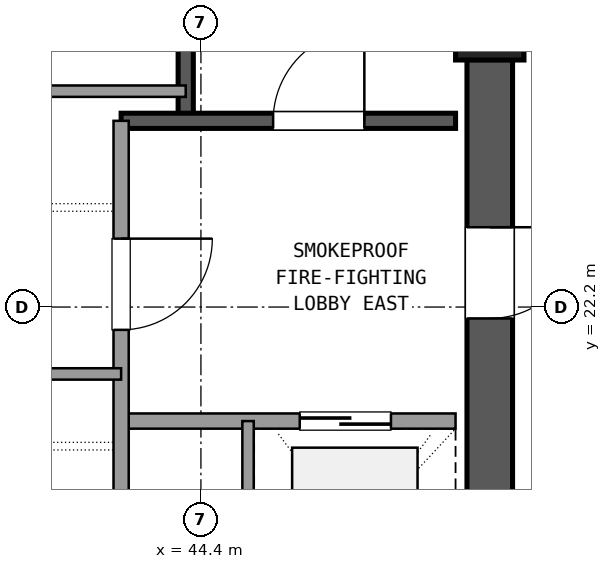
"""IFC4 building model, lengths in metres.
Left out: names, types, materials, properties, quantities, classifications, styles, units other than length and angle.
Written with IfcOpenShell. Run it as: python <this file> out.ifc"""

import sys

from ifc_helpers import new_model, si_unit, direction, frame, frame_2d, origin, origin_2d, place, context, subcontext, project, spatial, rectangle, extrude, element, fill, save


model = new_model("IFC4")
c1 = context("Model", 3, precision=1e-05, world=origin(), true_north=direction((0.0, 1.0)))
c2 = subcontext(c1, "Body", "Model", "MODEL_VIEW")
j1 = project(units=[si_unit("LENGTHUNIT", "METRE"), si_unit("PLANEANGLEUNIT", "RADIAN")], contexts=[c1])
p1 = place(None, origin())
s1 = spatial("IfcSite", under=j1, at=p1, CompositionType="ELEMENT")
p2 = place(p1, origin())
s2 = spatial("IfcBuilding", under=s1, at=p2, CompositionType="ELEMENT")
p3 = place(p2, frame((0.0, 0.0, 207.18)))
s3 = spatial("IfcBuildingStorey", under=s2, at=p3, CompositionType="ELEMENT", Elevation=207.18)
p4 = place(p3, frame((48.2, 25.9, 0.0), z_axis=(0.0, 0.0, 1.0), x_axis=(1.0, 0.0, 0.0)))
e1 = element("IfcColumn", 1, at=p4, inside=s3, PredefinedType="COLUMN", context=c2, shape_type="SweptSolid", body=[
    extrude(rectangle(XDim=0.9, YDim=0.9, at=origin_2d()), origin(), (0.0, 0.0, 1.0), 3.6),
])
p5 = place(p3, frame((48.2, 17.745, 0.0), z_axis=(0.0, 0.0, 1.0), x_axis=(0.0, 1.0, 0.0)))
e2 = element("IfcWall", 2, at=p5, inside=s3, PredefinedType="SHEAR", context=c2, shape_type="SweptSolid", body=[
    extrude(rectangle(XDim=7.71, YDim=0.6, at=frame_2d((3.855, 0.0))), origin(), (0.0, 0.0, 1.0), 3.32),
])
p6 = place(p5, frame((4.305, 0.0, 0.0)))
e3 = element("IfcOpeningElement", 3, at=p6, cuts=e2, PredefinedType="OPENING", context=c2, shape_type="SweptSolid", body=[
    extrude(rectangle(XDim=1.2, YDim=2.15, at=frame_2d((0.6, 1.075))), frame((0.0, 0.31, 0.0), z_axis=(0.0, -1.0, 0.0), x_axis=(1.0, 0.0, 0.0)), (0.0, 0.0, 1.0), 0.62),
])
p7 = place(p3, frame((44.2, 24.65, 0.0), z_axis=(0.0, 0.0, 1.0), x_axis=(0.0, 1.0, 0.0)))
e4 = element("IfcWall", 4, at=p7, inside=s3, PredefinedType="SHEAR", context=c2, shape_type="SweptSolid", body=[
    extrude(rectangle(XDim=9.4, YDim=0.2, at=frame_2d((4.7, 0.0))), origin(), (0.0, 0.0, 1.0), 3.32),
])
p8 = place(p3, frame((43.35, 24.65, 0.0), z_axis=(0.0, 0.0, 1.0), x_axis=(1.0, 0.0, 0.0)))
e5 = element("IfcWall", 5, at=p8, inside=s3, PredefinedType="SHEAR", context=c2, shape_type="SweptSolid", body=[
    extrude(rectangle(XDim=4.4, YDim=0.2, at=frame_2d((2.2, 0.0))), origin(), (0.0, 0.0, 1.0), 3.32),
])
p9 = place(p8, frame((2.0, 0.0, 0.0)))
e6 = element("IfcOpeningElement", 6, at=p9, cuts=e5, PredefinedType="OPENING", context=c2, shape_type="SweptSolid", body=[
    extrude(rectangle(XDim=1.2, YDim=2.15, at=frame_2d((0.6, 1.075))), frame((0.0, 0.11, 0.0), z_axis=(0.0, -1.0, 0.0), x_axis=(1.0, 0.0, 0.0)), (0.0, 0.0, 1.0), 0.22),
])
p10 = place(p3, frame((43.35, 20.7, 0.0), z_axis=(0.0, 0.0, 1.0), x_axis=(1.0, 0.0, 0.0)))
e7 = element("IfcWall", 7, at=p10, inside=s3, PredefinedType="SOLIDWALL", context=c2, shape_type="SweptSolid", body=[
    extrude(rectangle(XDim=4.4, YDim=0.2, at=frame_2d((2.2, 0.0))), origin(), (0.0, 0.0, 1.0), 2.61),
])
p11 = place(p10, frame((2.35, 0.0, 0.0)))
e8 = element("IfcOpeningElement", 8, at=p11, cuts=e7, PredefinedType="OPENING", context=c2, shape_type="SweptSolid", body=[
    extrude(rectangle(XDim=1.2, YDim=2.15, at=frame_2d((0.6, 1.075))), frame((0.0, 0.11, 0.0), z_axis=(0.0, -1.0, 0.0), x_axis=(1.0, 0.0, 0.0)), (0.0, 0.0, 1.0), 0.22),
])
p12 = place(p3, frame((43.35, 17.75, 0.0), z_axis=(0.0, 0.0, 1.0), x_axis=(0.0, 1.0, 0.0)))
e9 = element("IfcWall", 9, at=p12, inside=s3, PredefinedType="SOLIDWALL", context=c2, shape_type="SweptSolid", body=[
    extrude(rectangle(XDim=6.9, YDim=0.2, at=frame_2d((3.45, 0.0))), origin(), (0.0, 0.0, 1.0), 2.61),
])
p13 = place(p12, frame((4.15, 0.0, 0.0)))
e10 = element("IfcOpeningElement", 10, at=p13, cuts=e9, PredefinedType="OPENING", context=c2, shape_type="SweptSolid", body=[
    extrude(rectangle(XDim=1.2, YDim=2.15, at=frame_2d((0.6, 1.075))), frame((0.0, 0.11, 0.0), z_axis=(0.0, -1.0, 0.0), x_axis=(1.0, 0.0, 0.0)), (0.0, 0.0, 1.0), 0.22),
])
p14 = place(p3, frame((45.02, 17.75, 0.0), z_axis=(0.0, 0.0, 1.0), x_axis=(0.0, 1.0, 0.0)))
e11 = element("IfcWall", 11, at=p14, inside=s3, PredefinedType="PARTITIONING", context=c2, shape_type="SweptSolid", body=[
    extrude(rectangle(XDim=2.95, YDim=0.15, at=frame_2d((1.475, 0.0))), origin(), (0.0, 0.0, 1.0), 2.61),
])
p15 = place(p3, frame((37.25, 21.32, 0.0), z_axis=(0.0, 0.0, 1.0), x_axis=(1.0, 0.0, 0.0)))
e12 = element("IfcWall", 12, at=p15, inside=s3, PredefinedType="PARTITIONING", context=c2, shape_type="SweptSolid", body=[
    extrude(rectangle(XDim=6.1, YDim=0.15, at=frame_2d((3.05, 0.0))), origin(), (0.0, 0.0, 1.0), 2.61),
])
p16 = place(p15, frame((0.55, 0.0, 0.0)))
e13 = element("IfcOpeningElement", 13, at=p16, cuts=e12, PredefinedType="OPENING", context=c2, shape_type="SweptSolid", body=[
    extrude(rectangle(XDim=1.0, YDim=2.15, at=frame_2d((0.5, 1.075))), frame((0.0, 0.085, 0.0), z_axis=(0.0, -1.0, 0.0), x_axis=(1.0, 0.0, 0.0)), (0.0, 0.0, 1.0), 0.17),
])
p17 = place(p15, frame((2.5, 0.0, 0.0)))
e14 = element("IfcOpeningElement", 14, at=p17, cuts=e12, PredefinedType="OPENING", context=c2, shape_type="SweptSolid", body=[
    extrude(rectangle(XDim=1.0, YDim=2.15, at=frame_2d((0.5, 1.075))), frame((0.0, 0.085, 0.0), z_axis=(0.0, -1.0, 0.0), x_axis=(1.0, 0.0, 0.0)), (0.0, 0.0, 1.0), 0.17),
])
p18 = place(p3, frame((42.27, 25.04, 0.0), z_axis=(0.0, 0.0, 1.0), x_axis=(1.0, 0.0, 0.0)))
e15 = element("IfcWall", 15, at=p18, inside=s3, PredefinedType="PARTITIONING", context=c2, shape_type="SweptSolid", body=[
    extrude(rectangle(XDim=1.93, YDim=0.15, at=frame_2d((0.965, 0.0))), origin(), (0.0, 0.0, 1.0), 2.61),
])
p19 = place(p9, origin())
e16 = element("IfcDoor", 16, at=p19, inside=s3, OperationType="SINGLE_SWING_RIGHT", PredefinedType="DOOR", context=c2, shape_type="SweptSolid", body=[
    extrude(rectangle(XDim=1.2, YDim=2.15, at=frame_2d((0.6, 1.075))), frame((0.0, 0.025, 0.0), z_axis=(0.0, -1.0, 0.0), x_axis=(1.0, 0.0, 0.0)), (0.0, 0.0, 1.0), 0.05),
])
fill(e6, e16)
p20 = place(p11, origin())
e17 = element("IfcDoor", 17, at=p20, inside=s3, OperationType="SLIDING_TO_RIGHT", PredefinedType="DOOR", context=c2, shape_type="SweptSolid", body=[
    extrude(rectangle(XDim=1.2, YDim=2.15, at=frame_2d((0.6, 1.075))), frame((0.0, 0.025, 0.0), z_axis=(0.0, -1.0, 0.0), x_axis=(1.0, 0.0, 0.0)), (0.0, 0.0, 1.0), 0.05),
])
fill(e8, e17)
p21 = place(p13, frame((1.2, 0.0, 0.0), z_axis=(0.0, 0.0, 1.0), x_axis=(-1.0, 0.0, 0.0)))
e18 = element("IfcDoor", 18, at=p21, inside=s3, OperationType="SINGLE_SWING_RIGHT", PredefinedType="DOOR", context=c2, shape_type="SweptSolid", body=[
    extrude(rectangle(XDim=1.2, YDim=2.15, at=frame_2d((0.6, 1.075))), frame((0.0, 0.025, 0.0), z_axis=(0.0, -1.0, 0.0), x_axis=(1.0, 0.0, 0.0)), (0.0, 0.0, 1.0), 0.05),
])
fill(e10, e18)
p22 = place(p6, frame((1.2, 0.0, 0.0), z_axis=(0.0, 0.0, 1.0), x_axis=(-1.0, 0.0, 0.0)))
e19 = element("IfcDoor", 19, at=p22, inside=s3, OperationType="SINGLE_SWING_RIGHT", PredefinedType="DOOR", context=c2, shape_type="SweptSolid", body=[
    extrude(rectangle(XDim=1.2, YDim=2.15, at=frame_2d((0.6, 1.075))), frame((0.0, 0.025, 0.0), z_axis=(0.0, -1.0, 0.0), x_axis=(1.0, 0.0, 0.0)), (0.0, 0.0, 1.0), 0.05),
])
fill(e3, e19)
save(model, sys.argv[1])
